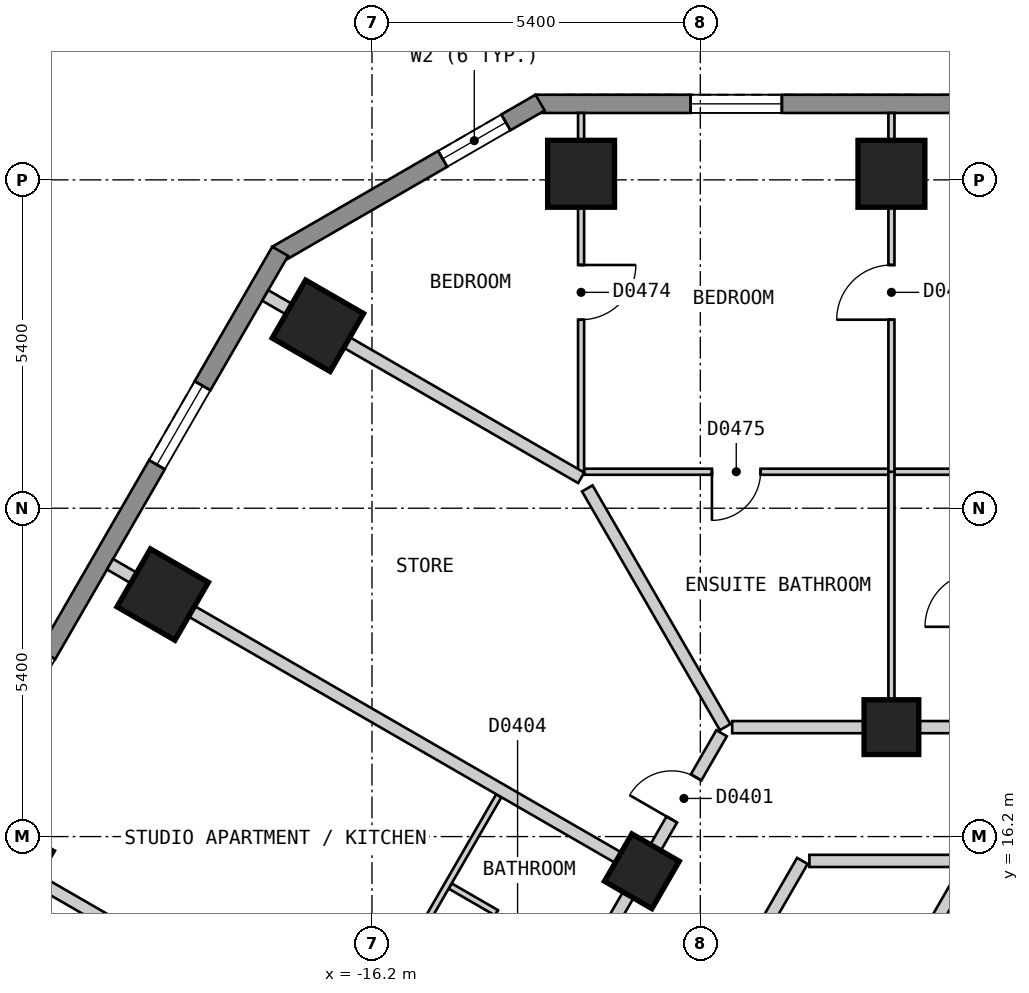
"""IFC4 building model, lengths in metres.
Left out: names, types, materials, properties, quantities, classifications, styles, units other than length and angle.
Written with IfcOpenShell. Run it as: python <this file> out.ifc"""

import sys

from ifc_helpers import new_model, si_unit, direction, frame, frame_2d, origin, origin_2d, place, context, subcontext, project, spatial, polyline, rectangle, outline, extrude, element, fill, save


model = new_model("IFC4")
c1 = context("Model", 3, precision=1e-05, world=origin(), true_north=direction((0.0, 1.0)))
c2 = subcontext(c1, "Body", "Model", "MODEL_VIEW")
j1 = project(units=[si_unit("LENGTHUNIT", "METRE"), si_unit("PLANEANGLEUNIT", "RADIAN")], contexts=[c1])
p1 = place(None, origin())
s1 = spatial("IfcSite", under=j1, at=p1, CompositionType="ELEMENT")
p2 = place(p1, origin())
s2 = spatial("IfcBuilding", under=s1, at=p2, CompositionType="ELEMENT")
p3 = place(p2, frame((0.0, 0.0, 38.4)))
s3 = spatial("IfcBuildingStorey", under=s2, at=p3, CompositionType="ELEMENT", Elevation=38.4)
for number, where, z_axis, x_axis in (
    (1, (-7.657, 27.1, 0.0), (0.0, 0.0, 1.0), (-1.0, 0.0, 0.0)),
    (2, (-12.761, 27.1, 0.0), (0.0, 0.0, 1.0), (-1.0, 0.0, 0.0)),
    (3, (-17.09, 24.6, 0.0), (0.0, 0.0, 1.0), (-0.5, -0.866, 0.0)),
    (4, (-19.642, 20.18, 0.0), (0.0, 0.0, 1.0), (-0.5, -0.866, 0.0)),
    (5, (-22.194, 15.759, 0.0), (0.0, 0.0, 1.0), (-0.5, -0.866, 0.0)),
):
    element("IfcColumn", number, at=place(p3, frame(where, z_axis=z_axis, x_axis=x_axis)), inside=s3, PredefinedType="COLUMN", context=c2, shape_type="SweptSolid", body=[
        extrude(rectangle(XDim=1.1, YDim=1.1, at=origin_2d()), origin(), (0.0, 0.0, 1.0), 3.0),
    ])
for number, where, z_axis, x_axis in (
    (6, (-7.657, 18.0, 0.0), (0.0, 0.0, 1.0), (-1.0, 0.0, 0.0)),
    (7, (-11.761, 15.63, 0.0), (0.0, 0.0, 1.0), (-0.5, -0.866, 0.0)),
):
    element("IfcColumn", number, at=place(p3, frame(where, z_axis=z_axis, x_axis=x_axis)), inside=s3, PredefinedType="COLUMN", context=c2, shape_type="SweptSolid", body=[
        extrude(rectangle(XDim=0.9, YDim=0.9, at=origin_2d()), origin(), (0.0, 0.0, 1.0), 3.0),
    ])
p4 = place(p3, frame((13.51, 28.25, 0.0), z_axis=(0.0, 0.0, 1.0), x_axis=(-1.0, 0.0, 0.0)))
e8 = element("IfcWall", 8, at=p4, inside=s3, PredefinedType="SOLIDWALL", context=c2, shape_type="SweptSolid", body=[
    extrude(outline(polyline([(0.0, -0.15), (27.02, -0.15), (26.94, 0.15), (0.08, 0.15), (0.0, -0.15)])), origin(), (0.0, 0.0, 1.0), 2.7),
])
p5 = place(p4, frame((2.553, 0.0, 0.15)))
e9 = element("IfcOpeningElement", 9, at=p5, cuts=e8, PredefinedType="OPENING", context=c2, shape_type="SweptSolid", body=[
    extrude(rectangle(XDim=1.5, YDim=2.1, at=frame_2d((0.75, 1.05))), frame((0.0, 0.16, 0.0), z_axis=(0.0, -1.0, 0.0), x_axis=(1.0, 0.0, 0.0)), (0.0, 0.0, 1.0), 0.32),
])
p6 = place(p4, frame((7.657, 0.0, 0.15)))
e10 = element("IfcOpeningElement", 10, at=p6, cuts=e8, PredefinedType="OPENING", context=c2, shape_type="SweptSolid", body=[
    extrude(rectangle(XDim=1.5, YDim=2.1, at=frame_2d((0.75, 1.05))), frame((0.0, 0.16, 0.0), z_axis=(0.0, -1.0, 0.0), x_axis=(1.0, 0.0, 0.0)), (0.0, 0.0, 1.0), 0.32),
])
p7 = place(p4, frame((12.761, 0.0, 0.15)))
e11 = element("IfcOpeningElement", 11, at=p7, cuts=e8, PredefinedType="OPENING", context=c2, shape_type="SweptSolid", body=[
    extrude(rectangle(XDim=1.5, YDim=2.1, at=frame_2d((0.75, 1.05))), frame((0.0, 0.16, 0.0), z_axis=(0.0, -1.0, 0.0), x_axis=(1.0, 0.0, 0.0)), (0.0, 0.0, 1.0), 0.32),
])
p8 = place(p4, frame((17.865, 0.0, 0.15)))
e12 = element("IfcOpeningElement", 12, at=p8, cuts=e8, PredefinedType="OPENING", context=c2, shape_type="SweptSolid", body=[
    extrude(rectangle(XDim=1.5, YDim=2.1, at=frame_2d((0.75, 1.05))), frame((0.0, 0.16, 0.0), z_axis=(0.0, -1.0, 0.0), x_axis=(1.0, 0.0, 0.0)), (0.0, 0.0, 1.0), 0.32),
])
p9 = place(p4, frame((22.969, 0.0, 0.15)))
e13 = element("IfcOpeningElement", 13, at=p9, cuts=e8, PredefinedType="OPENING", context=c2, shape_type="SweptSolid", body=[
    extrude(rectangle(XDim=1.5, YDim=2.1, at=frame_2d((0.75, 1.05))), frame((0.0, 0.16, 0.0), z_axis=(0.0, -1.0, 0.0), x_axis=(1.0, 0.0, 0.0)), (0.0, 0.0, 1.0), 0.32),
])
p10 = place(p3, frame((-13.435, 28.27, 0.0), z_axis=(0.0, 0.0, 1.0), x_axis=(-0.866010750942, -0.50002537861, 0.0)))
e14 = element("IfcWall", 14, at=p10, inside=s3, PredefinedType="SOLIDWALL", context=c2, shape_type="SweptSolid", body=[
    extrude(outline(polyline([(0.0, -0.15), (5.0, -0.15), (4.919, 0.15), (0.08, 0.15), (0.0, -0.15)])), origin(), (0.0, 0.0, 1.0), 2.7),
])
p11 = place(p10, frame((0.65, 0.0, 0.15)))
e15 = element("IfcOpeningElement", 15, at=p11, cuts=e14, PredefinedType="OPENING", context=c2, shape_type="SweptSolid", body=[
    extrude(rectangle(XDim=1.2, YDim=2.1, at=frame_2d((0.6, 1.05))), frame((0.0, 0.16, 0.0), z_axis=(0.0, -1.0, 0.0), x_axis=(1.0, 0.0, 0.0)), (0.0, 0.0, 1.0), 0.32),
])
p12 = place(p3, frame((-17.71, 25.825, 0.0), z_axis=(0.0, 0.0, 1.0), x_axis=(-0.500001938803, -0.866024284413, 0.0)))
e16 = element("IfcWall", 16, at=p12, inside=s3, PredefinedType="SOLIDWALL", context=c2, shape_type="SweptSolid", body=[
    extrude(outline(polyline([(0.0, -0.15), (27.02, -0.15), (26.94, 0.15), (0.08, 0.15), (0.0, -0.15)])), origin(), (0.0, 0.0, 1.0), 2.7),
])
p13 = place(p12, frame((2.553, 0.0, 0.15)))
e17 = element("IfcOpeningElement", 17, at=p13, cuts=e16, PredefinedType="OPENING", context=c2, shape_type="SweptSolid", body=[
    extrude(rectangle(XDim=1.5, YDim=2.1, at=frame_2d((0.75, 1.05))), frame((0.0, 0.16, 0.0), z_axis=(0.0, -1.0, 0.0), x_axis=(1.0, 0.0, 0.0)), (0.0, 0.0, 1.0), 0.32),
])
p14 = place(p12, frame((7.658, 0.0, 0.15)))
e18 = element("IfcOpeningElement", 18, at=p14, cuts=e16, PredefinedType="OPENING", context=c2, shape_type="SweptSolid", body=[
    extrude(rectangle(XDim=1.5, YDim=2.1, at=frame_2d((0.75, 1.05))), frame((0.0, 0.16, 0.0), z_axis=(0.0, -1.0, 0.0), x_axis=(1.0, 0.0, 0.0)), (0.0, 0.0, 1.0), 0.32),
])
p15 = place(p12, frame((12.761, 0.0, 0.15)))
e19 = element("IfcOpeningElement", 19, at=p15, cuts=e16, PredefinedType="OPENING", context=c2, shape_type="SweptSolid", body=[
    extrude(rectangle(XDim=1.5, YDim=2.1, at=frame_2d((0.75, 1.05))), frame((0.0, 0.16, 0.0), z_axis=(0.0, -1.0, 0.0), x_axis=(1.0, 0.0, 0.0)), (0.0, 0.0, 1.0), 0.32),
])
p16 = place(p12, frame((17.865, 0.0, 0.15)))
e20 = element("IfcOpeningElement", 20, at=p16, cuts=e16, PredefinedType="OPENING", context=c2, shape_type="SweptSolid", body=[
    extrude(rectangle(XDim=1.5, YDim=2.1, at=frame_2d((0.75, 1.05))), frame((0.0, 0.16, 0.0), z_axis=(0.0, -1.0, 0.0), x_axis=(1.0, 0.0, 0.0)), (0.0, 0.0, 1.0), 0.32),
])
p17 = place(p12, frame((22.969, 0.0, 0.15)))
e21 = element("IfcOpeningElement", 21, at=p17, cuts=e16, PredefinedType="OPENING", context=c2, shape_type="SweptSolid", body=[
    extrude(rectangle(XDim=1.5, YDim=2.1, at=frame_2d((0.75, 1.05))), frame((0.0, 0.16, 0.0), z_axis=(0.0, -1.0, 0.0), x_axis=(1.0, 0.0, 0.0)), (0.0, 0.0, 1.0), 0.32),
])
p18 = place(p3, frame((-9.006, 15.8, 0.0), z_axis=(0.0, 0.0, 1.0), x_axis=(1.0, 0.0, 0.0)))
e22 = element("IfcWall", 22, at=p18, inside=s3, PredefinedType="PARTITIONING", context=c2, shape_type="SweptSolid", body=[
    extrude(rectangle(XDim=2.54, YDim=0.2, at=frame_2d((1.27, 0.0))), origin(), (0.0, 0.0, 1.0), 2.7),
])
p19 = place(p3, frame((-10.276, 18.0, 0.0), z_axis=(0.0, 0.0, 1.0), x_axis=(1.0, 0.0, 0.0)))
e23 = element("IfcWall", 23, at=p19, inside=s3, PredefinedType="PARTITIONING", context=c2, shape_type="SweptSolid", body=[
    extrude(rectangle(XDim=20.5, YDim=0.2, at=frame_2d((10.25, 0.0))), origin(), (0.0, 0.0, 1.0), 2.7),
])
p20 = place(p19, frame((19.265, 0.0, 0.0)))
e24 = element("IfcOpeningElement", 24, at=p20, cuts=e23, PredefinedType="OPENING", context=c2, shape_type="SweptSolid", body=[
    extrude(rectangle(XDim=1.0, YDim=2.1, at=frame_2d((0.5, 1.05))), frame((0.0, 0.11, 0.0), z_axis=(0.0, -1.0, 0.0), x_axis=(1.0, 0.0, 0.0)), (0.0, 0.0, 1.0), 0.22),
])
p21 = place(p19, frame((9.775, 0.0, 0.0)))
e25 = element("IfcOpeningElement", 25, at=p21, cuts=e23, PredefinedType="OPENING", context=c2, shape_type="SweptSolid", body=[
    extrude(rectangle(XDim=1.0, YDim=2.1, at=frame_2d((0.5, 1.05))), frame((0.0, 0.11, 0.0), z_axis=(0.0, -1.0, 0.0), x_axis=(1.0, 0.0, 0.0)), (0.0, 0.0, 1.0), 0.22),
])
p22 = place(p19, frame((4.671, 0.0, 0.0)))
e26 = element("IfcOpeningElement", 26, at=p22, cuts=e23, PredefinedType="OPENING", context=c2, shape_type="SweptSolid", body=[
    extrude(rectangle(XDim=1.0, YDim=2.1, at=frame_2d((0.5, 1.05))), frame((0.0, 0.11, 0.0), z_axis=(0.0, -1.0, 0.0), x_axis=(1.0, 0.0, 0.0)), (0.0, 0.0, 1.0), 0.22),
])
p23 = place(p3, frame((-10.854, 8.0, 0.0), z_axis=(0.0, 0.0, 1.0), x_axis=(0.499964141897, 0.86604610548, 0.0)))
e27 = element("IfcWall", 27, at=p23, inside=s3, PredefinedType="PARTITIONING", context=c2, shape_type="SweptSolid", body=[
    extrude(rectangle(XDim=9.007, YDim=0.2, at=frame_2d((4.503, 0.0))), origin(), (0.0, 0.0, 1.0), 2.7),
])
p24 = place(p3, frame((-18.244, -0.001, 0.0), z_axis=(0.0, 0.0, 1.0), x_axis=(0.499962999376, 0.866046765051, 0.0)))
e28 = element("IfcWall", 28, at=p24, inside=s3, PredefinedType="PARTITIONING", context=c2, shape_type="SweptSolid", body=[
    extrude(rectangle(XDim=18.245, YDim=0.2, at=frame_2d((9.123, 0.0))), origin(), (0.0, 0.0, 1.0), 2.7),
])
p25 = place(p24, frame((8.672, 0.0, 0.0)))
e29 = element("IfcOpeningElement", 29, at=p25, cuts=e28, PredefinedType="OPENING", context=c2, shape_type="SweptSolid", body=[
    extrude(rectangle(XDim=0.9, YDim=2.1, at=frame_2d((0.45, 1.05))), frame((0.0, 0.11, 0.0), z_axis=(0.0, -1.0, 0.0), x_axis=(1.0, 0.0, 0.0)), (0.0, 0.0, 1.0), 0.22),
])
p26 = place(p3, frame((-20.727, 0.099, 0.0), z_axis=(0.0, 0.0, 1.0), x_axis=(0.499993204491, 0.866029327138, 0.0)))
e30 = element("IfcWall", 30, at=p26, inside=s3, PredefinedType="PARTITIONING", context=c2, shape_type="SweptSolid", body=[
    extrude(rectangle(XDim=20.554, YDim=0.2, at=frame_2d((10.277, 0.0))), origin(), (0.0, 0.0, 1.0), 2.7),
])
p27 = place(p26, frame((18.916, 0.0, 0.0)))
e31 = element("IfcOpeningElement", 31, at=p27, cuts=e30, PredefinedType="OPENING", context=c2, shape_type="SweptSolid", body=[
    extrude(rectangle(XDim=0.8, YDim=2.1, at=frame_2d((0.4, 1.05))), frame((0.0, 0.11, 0.0), z_axis=(0.0, -1.0, 0.0), x_axis=(1.0, 0.0, 0.0)), (0.0, 0.0, 1.0), 0.22),
])
p28 = place(p26, frame((14.88, 0.0, 0.0)))
e32 = element("IfcOpeningElement", 32, at=p28, cuts=e30, PredefinedType="OPENING", context=c2, shape_type="SweptSolid", body=[
    extrude(rectangle(XDim=1.0, YDim=2.1, at=frame_2d((0.5, 1.05))), frame((0.0, 0.11, 0.0), z_axis=(0.0, -1.0, 0.0), x_axis=(1.0, 0.0, 0.0)), (0.0, 0.0, 1.0), 0.22),
])
p29 = place(p26, frame((9.776, 0.0, 0.0)))
e33 = element("IfcOpeningElement", 33, at=p29, cuts=e30, PredefinedType="OPENING", context=c2, shape_type="SweptSolid", body=[
    extrude(rectangle(XDim=1.0, YDim=2.1, at=frame_2d((0.5, 1.05))), frame((0.0, 0.11, 0.0), z_axis=(0.0, -1.0, 0.0), x_axis=(1.0, 0.0, 0.0)), (0.0, 0.0, 1.0), 0.22),
])
p30 = place(p26, frame((4.673, 0.0, 0.0)))
e34 = element("IfcOpeningElement", 34, at=p30, cuts=e30, PredefinedType="OPENING", context=c2, shape_type="SweptSolid", body=[
    extrude(rectangle(XDim=1.0, YDim=2.1, at=frame_2d((0.5, 1.05))), frame((0.0, 0.11, 0.0), z_axis=(0.0, -1.0, 0.0), x_axis=(1.0, 0.0, 0.0)), (0.0, 0.0, 1.0), 0.22),
])
p31 = place(p26, frame((0.838, 0.0, 0.0)))
e35 = element("IfcOpeningElement", 35, at=p31, cuts=e30, PredefinedType="OPENING", context=c2, shape_type="SweptSolid", body=[
    extrude(rectangle(XDim=0.8, YDim=2.1, at=frame_2d((0.4, 1.05))), frame((0.0, 0.11, 0.0), z_axis=(0.0, -1.0, 0.0), x_axis=(1.0, 0.0, 0.0)), (0.0, 0.0, 1.0), 0.22),
])
p32 = place(p3, frame((-14.914, 15.387, 0.0), z_axis=(0.0, 0.0, 1.0), x_axis=(0.865983051302, -0.500073349477, 0.0)))
e36 = element("IfcWall", 36, at=p32, inside=s3, PredefinedType="PARTITIONING", context=c2, shape_type="SweptSolid", body=[
    extrude(rectangle(XDim=2.509, YDim=0.1, at=frame_2d((1.255, 0.0))), origin(), (0.0, 0.0, 1.0), 2.7),
])
p33 = place(p32, frame((0.88, 0.0, 0.0)))
e37 = element("IfcOpeningElement", 37, at=p33, cuts=e36, PredefinedType="OPENING", context=c2, shape_type="SweptSolid", body=[
    extrude(rectangle(XDim=0.8, YDim=2.1, at=frame_2d((0.4, 1.05))), frame((0.0, 0.06, 0.0), z_axis=(0.0, -1.0, 0.0), x_axis=(1.0, 0.0, 0.0)), (0.0, 0.0, 1.0), 0.12),
])
p34 = place(p3, frame((-12.711, 22.2, 0.0), z_axis=(0.0, 0.0, 1.0), x_axis=(1.0, 0.0, 0.0)))
e38 = element("IfcWall", 38, at=p34, inside=s3, PredefinedType="PARTITIONING", context=c2, shape_type="SweptSolid", body=[
    extrude(rectangle(XDim=10.058, YDim=0.1, at=frame_2d((5.029, 0.0))), origin(), (0.0, 0.0, 1.0), 2.7),
])
p35 = place(p34, frame((7.156, 0.0, 0.0)))
e39 = element("IfcOpeningElement", 39, at=p35, cuts=e38, PredefinedType="OPENING", context=c2, shape_type="SweptSolid", body=[
    extrude(rectangle(XDim=0.9, YDim=2.1, at=frame_2d((0.45, 1.05))), frame((0.0, 0.06, 0.0), z_axis=(0.0, -1.0, 0.0), x_axis=(1.0, 0.0, 0.0)), (0.0, 0.0, 1.0), 0.12),
])
p36 = place(p34, frame((2.102, 0.0, 0.0)))
e40 = element("IfcOpeningElement", 40, at=p36, cuts=e38, PredefinedType="OPENING", context=c2, shape_type="SweptSolid", body=[
    extrude(rectangle(XDim=0.8, YDim=2.1, at=frame_2d((0.4, 1.05))), frame((0.0, 0.06, 0.0), z_axis=(0.0, -1.0, 0.0), x_axis=(1.0, 0.0, 0.0)), (0.0, 0.0, 1.0), 0.12),
])
p37 = place(p3, frame((-15.723, 14.087, 0.0), z_axis=(0.0, 0.0, 1.0), x_axis=(0.500204249835, 0.865907447969, 0.0)))
e41 = element("IfcWall", 41, at=p37, inside=s3, PredefinedType="PARTITIONING", context=c2, shape_type="SweptSolid", body=[
    extrude(rectangle(XDim=3.217, YDim=0.1, at=frame_2d((1.608, 0.0))), origin(), (0.0, 0.0, 1.0), 2.7),
])
p38 = place(p3, frame((-7.657, 18.1, 0.0), z_axis=(0.0, 0.0, 1.0), x_axis=(0.0, 1.0, 0.0)))
e42 = element("IfcWall", 42, at=p38, inside=s3, PredefinedType="PARTITIONING", context=c2, shape_type="SweptSolid", body=[
    extrude(rectangle(XDim=4.1, YDim=0.1, at=frame_2d((2.05, 0.0))), origin(), (0.0, 0.0, 1.0), 2.7),
])
p39 = place(p3, frame((-12.761, 22.2, 0.0), z_axis=(0.0, 0.0, 1.0), x_axis=(0.0, 1.0, 0.0)))
e43 = element("IfcWall", 43, at=p39, inside=s3, PredefinedType="PARTITIONING", context=c2, shape_type="SweptSolid", body=[
    extrude(rectangle(XDim=5.9, YDim=0.1, at=frame_2d((2.95, 0.0))), origin(), (0.0, 0.0, 1.0), 2.7),
])
p40 = place(p39, frame((2.5, 0.0, 0.0)))
e44 = element("IfcOpeningElement", 44, at=p40, cuts=e43, PredefinedType="OPENING", context=c2, shape_type="SweptSolid", body=[
    extrude(rectangle(XDim=0.9, YDim=2.1, at=frame_2d((0.45, 1.05))), frame((0.0, 0.06, 0.0), z_axis=(0.0, -1.0, 0.0), x_axis=(1.0, 0.0, 0.0)), (0.0, 0.0, 1.0), 0.12),
])
p41 = place(p3, frame((-12.659, 21.926, 0.0), z_axis=(0.0, 0.0, 1.0), x_axis=(0.500025458316, -0.86601070492, 0.0)))
e45 = element("IfcWall", 45, at=p41, inside=s3, PredefinedType="PARTITIONING", context=c2, shape_type="SweptSolid", body=[
    extrude(rectangle(XDim=4.533, YDim=0.2, at=frame_2d((2.267, 0.0))), origin(), (0.0, 0.0, 1.0), 2.7),
])
p42 = place(p3, frame((-20.508, 20.679, 0.0), z_axis=(0.0, 0.0, 1.0), x_axis=(0.866047370643, -0.499961950354, 0.0)))
e46 = element("IfcWall", 46, at=p42, inside=s3, PredefinedType="PARTITIONING", context=c2, shape_type="SweptSolid", body=[
    extrude(rectangle(XDim=10.001, YDim=0.2, at=frame_2d((5.0, 0.0))), origin(), (0.0, 0.0, 1.0), 2.7),
])
p43 = place(p3, frame((-17.955, 25.099, 0.0), z_axis=(0.0, 0.0, 1.0), x_axis=(0.86609140076, -0.499885672459, 0.0)))
e47 = element("IfcWall", 47, at=p43, inside=s3, PredefinedType="PARTITIONING", context=c2, shape_type="SweptSolid", body=[
    extrude(rectangle(XDim=6.0, YDim=0.2, at=frame_2d((3.0, 0.0))), origin(), (0.0, 0.0, 1.0), 2.7),
])
p44 = place(p3, frame((-23.06, 16.259, 0.0), z_axis=(0.0, 0.0, 1.0), x_axis=(0.866047370643, -0.499961950354, 0.0)))
e48 = element("IfcWall", 48, at=p44, inside=s3, PredefinedType="PARTITIONING", context=c2, shape_type="SweptSolid", body=[
    extrude(rectangle(XDim=10.001, YDim=0.2, at=frame_2d((5.0, 0.0))), origin(), (0.0, 0.0, 1.0), 2.7),
])
p45 = place(p3, frame((-7.657, 22.2, 0.0), z_axis=(0.0, 0.0, 1.0), x_axis=(0.0, 1.0, 0.0)))
e49 = element("IfcWall", 49, at=p45, inside=s3, PredefinedType="PARTITIONING", context=c2, shape_type="SweptSolid", body=[
    extrude(rectangle(XDim=5.9, YDim=0.1, at=frame_2d((2.95, 0.0))), origin(), (0.0, 0.0, 1.0), 2.7),
])
p46 = place(p45, frame((2.5, 0.0, 0.0)))
e50 = element("IfcOpeningElement", 50, at=p46, cuts=e49, PredefinedType="OPENING", context=c2, shape_type="SweptSolid", body=[
    extrude(rectangle(XDim=0.9, YDim=2.1, at=frame_2d((0.45, 1.05))), frame((0.0, 0.06, 0.0), z_axis=(0.0, -1.0, 0.0), x_axis=(1.0, 0.0, 0.0)), (0.0, 0.0, 1.0), 0.12),
])
p47 = place(p9, origin())
e51 = element("IfcWindow", 51, at=p47, inside=s3, PartitioningType="SINGLE_PANEL", PredefinedType="WINDOW", context=c2, shape_type="SweptSolid", body=[
    extrude(rectangle(XDim=1.5, YDim=2.1, at=frame_2d((0.75, 1.05))), frame((0.0, 0.03, 0.0), z_axis=(0.0, -1.0, 0.0), x_axis=(1.0, 0.0, 0.0)), (0.0, 0.0, 1.0), 0.06),
])
fill(e13, e51)
p48 = place(p11, origin())
e52 = element("IfcWindow", 52, at=p48, inside=s3, PartitioningType="SINGLE_PANEL", PredefinedType="WINDOW", context=c2, shape_type="SweptSolid", body=[
    extrude(rectangle(XDim=1.2, YDim=2.1, at=frame_2d((0.6, 1.05))), frame((0.0, 0.03, 0.0), z_axis=(0.0, -1.0, 0.0), x_axis=(1.0, 0.0, 0.0)), (0.0, 0.0, 1.0), 0.06),
])
fill(e15, e52)
p49 = place(p13, origin())
e53 = element("IfcWindow", 53, at=p49, inside=s3, PartitioningType="SINGLE_PANEL", PredefinedType="WINDOW", context=c2, shape_type="SweptSolid", body=[
    extrude(rectangle(XDim=1.5, YDim=2.1, at=frame_2d((0.75, 1.05))), frame((0.0, 0.03, 0.0), z_axis=(0.0, -1.0, 0.0), x_axis=(1.0, 0.0, 0.0)), (0.0, 0.0, 1.0), 0.06),
])
fill(e17, e53)
p50 = place(p27, origin())
e54 = element("IfcDoor", 54, at=p50, inside=s3, OperationType="SINGLE_SWING_LEFT", PredefinedType="DOOR", context=c2, shape_type="SweptSolid", body=[
    extrude(rectangle(XDim=0.8, YDim=2.1, at=frame_2d((0.4, 1.05))), frame((0.0, 0.025, 0.0), z_axis=(0.0, -1.0, 0.0), x_axis=(1.0, 0.0, 0.0)), (0.0, 0.0, 1.0), 0.05),
])
fill(e31, e54)
p51 = place(p33, origin())
e55 = element("IfcDoor", 55, at=p51, inside=s3, OperationType="SINGLE_SWING_RIGHT", PredefinedType="DOOR", context=c2, shape_type="SweptSolid", body=[
    extrude(rectangle(XDim=0.8, YDim=2.1, at=frame_2d((0.4, 1.05))), frame((0.0, 0.025, 0.0), z_axis=(0.0, -1.0, 0.0), x_axis=(1.0, 0.0, 0.0)), (0.0, 0.0, 1.0), 0.05),
])
fill(e37, e55)
p52 = place(p46, origin())
e56 = element("IfcDoor", 56, at=p52, inside=s3, OperationType="SINGLE_SWING_LEFT", PredefinedType="DOOR", context=c2, shape_type="SweptSolid", body=[
    extrude(rectangle(XDim=0.9, YDim=2.1, at=frame_2d((0.45, 1.05))), frame((0.0, 0.025, 0.0), z_axis=(0.0, -1.0, 0.0), x_axis=(1.0, 0.0, 0.0)), (0.0, 0.0, 1.0), 0.05),
])
fill(e50, e56)
p53 = place(p40, origin())
e57 = element("IfcDoor", 57, at=p53, inside=s3, OperationType="SINGLE_SWING_RIGHT", PredefinedType="DOOR", context=c2, shape_type="SweptSolid", body=[
    extrude(rectangle(XDim=0.9, YDim=2.1, at=frame_2d((0.45, 1.05))), frame((0.0, 0.025, 0.0), z_axis=(0.0, -1.0, 0.0), x_axis=(1.0, 0.0, 0.0)), (0.0, 0.0, 1.0), 0.05),
])
fill(e44, e57)
p54 = place(p36, origin())
e58 = element("IfcDoor", 58, at=p54, inside=s3, OperationType="SINGLE_SWING_LEFT", PredefinedType="DOOR", context=c2, shape_type="SweptSolid", body=[
    extrude(rectangle(XDim=0.8, YDim=2.1, at=frame_2d((0.4, 1.05))), frame((0.0, 0.025, 0.0), z_axis=(0.0, -1.0, 0.0), x_axis=(1.0, 0.0, 0.0)), (0.0, 0.0, 1.0), 0.05),
])
fill(e40, e58)
save(model, sys.argv[1])
